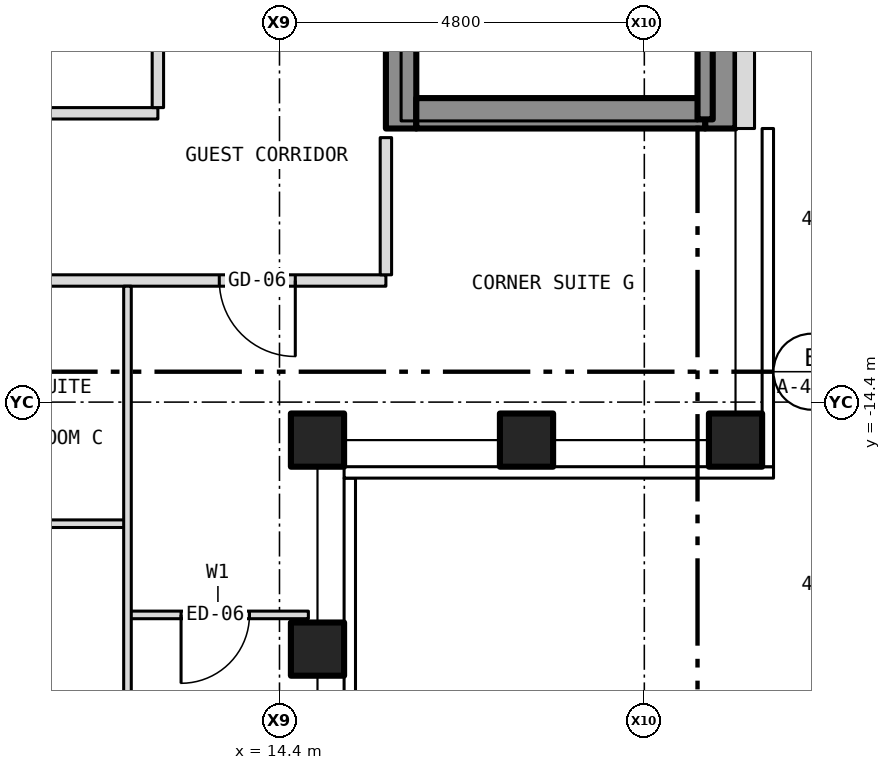
"""IFC4 building model, lengths in metres.
Left out: names, types, materials, properties, quantities, classifications, styles, units other than length and angle.
Written with IfcOpenShell. Run it as: python <this file> out.ifc"""

import sys

from ifc_helpers import new_model, si_unit, direction, frame, frame_2d, origin, origin_2d, place, context, subcontext, project, spatial, rectangle, hollow_rectangle, extrude, element, fill, save


model = new_model("IFC4")
c1 = context("Model", 3, precision=1e-05, world=origin(), true_north=direction((0.0, 1.0)))
c2 = subcontext(c1, "Body", "Model", "MODEL_VIEW")
j1 = project(units=[si_unit("LENGTHUNIT", "METRE"), si_unit("PLANEANGLEUNIT", "RADIAN")], contexts=[c1])
p1 = place(None, origin())
s1 = spatial("IfcSite", under=j1, at=p1, CompositionType="ELEMENT")
p2 = place(p1, origin())
s2 = spatial("IfcBuilding", under=s1, at=p2, CompositionType="ELEMENT")
p3 = place(p2, frame((0.0, 0.0, 229.5)))
s3 = spatial("IfcBuildingStorey", under=s2, at=p3, CompositionType="ELEMENT", Elevation=229.5)
for number, where, z_axis, x_axis in (
    (1, (20.4, -14.9, -0.15), (0.0, 0.0, 1.0), (1.0, 0.0, 0.0)),
    (2, (14.9, -14.9, -0.15), (0.0, 0.0, 1.0), (1.0, 0.0, 0.0)),
    (3, (14.9, -17.65, -0.15), (0.0, 0.0, 1.0), (1.0, 0.0, 0.0)),
    (4, (17.65, -14.9, -0.15), (0.0, 0.0, 1.0), (1.0, 0.0, 0.0)),
):
    element("IfcColumn", number, at=place(p3, frame(where, z_axis=z_axis, x_axis=x_axis)), inside=s3, PredefinedType="COLUMN", context=c2, shape_type="SweptSolid", body=[
        extrude(hollow_rectangle(XDim=0.7, YDim=0.7, WallThickness=0.04, at=origin_2d()), origin(), (0.0, 0.0, 1.0), 3.5),
    ])
p4 = place(p3, frame((16.0, -10.8, 0.0), z_axis=(0.0, 0.0, 1.0), x_axis=(0.0, 1.0, 0.0)))
e5 = element("IfcWall", 5, at=p4, inside=s3, PredefinedType="SHEAR", context=c2, shape_type="SweptSolid", body=[
    extrude(rectangle(XDim=21.6, YDim=0.4, at=frame_2d((10.8, 0.0))), origin(), (0.0, 0.0, 1.0), 3.25),
])
p5 = place(p4, frame((9.4, 0.0, 0.0)))
e6 = element("IfcOpeningElement", 6, at=p5, cuts=e5, PredefinedType="OPENING", context=c2, shape_type="SweptSolid", body=[
    extrude(rectangle(XDim=1.1, YDim=2.1, at=frame_2d((0.55, 1.05))), frame((0.0, 0.212, 0.0), z_axis=(0.0, -1.0, 0.0), x_axis=(1.0, 0.0, 0.0)), (0.0, 0.0, 1.0), 0.424),
])
p6 = place(p4, frame((11.5, 0.0, 0.0)))
e7 = element("IfcOpeningElement", 7, at=p6, cuts=e5, PredefinedType="OPENING", context=c2, shape_type="SweptSolid", body=[
    extrude(rectangle(XDim=1.1, YDim=2.1, at=frame_2d((0.55, 1.05))), frame((0.0, 0.212, 0.0), z_axis=(0.0, -1.0, 0.0), x_axis=(1.0, 0.0, 0.0)), (0.0, 0.0, 1.0), 0.424),
])
p7 = place(p4, frame((13.6, 0.0, 0.0)))
e8 = element("IfcOpeningElement", 8, at=p7, cuts=e5, PredefinedType="OPENING", context=c2, shape_type="SweptSolid", body=[
    extrude(rectangle(XDim=1.1, YDim=2.1, at=frame_2d((0.55, 1.05))), frame((0.0, 0.212, 0.0), z_axis=(0.0, -1.0, 0.0), x_axis=(1.0, 0.0, 0.0)), (0.0, 0.0, 1.0), 0.424),
])
p8 = place(p4, frame((15.7, 0.0, 0.0)))
e9 = element("IfcOpeningElement", 9, at=p8, cuts=e5, PredefinedType="OPENING", context=c2, shape_type="SweptSolid", body=[
    extrude(rectangle(XDim=1.1, YDim=2.1, at=frame_2d((0.55, 1.05))), frame((0.0, 0.212, 0.0), z_axis=(0.0, -1.0, 0.0), x_axis=(1.0, 0.0, 0.0)), (0.0, 0.0, 1.0), 0.424),
])
p9 = place(p4, frame((17.8, 0.0, 0.0)))
e10 = element("IfcOpeningElement", 10, at=p9, cuts=e5, PredefinedType="OPENING", context=c2, shape_type="SweptSolid", body=[
    extrude(rectangle(XDim=1.1, YDim=2.1, at=frame_2d((0.55, 1.05))), frame((0.0, 0.212, 0.0), z_axis=(0.0, -1.0, 0.0), x_axis=(1.0, 0.0, 0.0)), (0.0, 0.0, 1.0), 0.424),
])
p10 = place(p4, frame((5.642, 0.0, 0.0)))
e11 = element("IfcOpeningElement", 11, at=p10, cuts=e5, PredefinedType="OPENING", context=c2, shape_type="SweptSolid", body=[
    extrude(rectangle(XDim=1.1, YDim=2.1, at=frame_2d((0.55, 1.05))), frame((0.0, 0.212, 0.0), z_axis=(0.0, -1.0, 0.0), x_axis=(1.0, 0.0, 0.0)), (0.0, 0.0, 1.0), 0.424),
])
p11 = place(p4, frame((7.5, 0.0, 0.0)))
e12 = element("IfcOpeningElement", 12, at=p11, cuts=e5, PredefinedType="OPENING", context=c2, shape_type="SweptSolid", body=[
    extrude(rectangle(XDim=1.1, YDim=2.1, at=frame_2d((0.55, 1.05))), frame((0.0, 0.212, 0.0), z_axis=(0.0, -1.0, 0.0), x_axis=(1.0, 0.0, 0.0)), (0.0, 0.0, 1.0), 0.424),
])
p12 = place(p4, frame((20.0, 0.0, 0.0)))
e13 = element("IfcOpeningElement", 13, at=p12, cuts=e5, PredefinedType="OPENING", context=c2, shape_type="SweptSolid", body=[
    extrude(rectangle(XDim=0.9, YDim=2.1, at=frame_2d((0.45, 1.05))), frame((0.0, 0.212, 0.0), z_axis=(0.0, -1.0, 0.0), x_axis=(1.0, 0.0, 0.0)), (0.0, 0.0, 1.0), 0.424),
])
p13 = place(p3, frame((20.2, -10.8, 0.0), z_axis=(0.0, 0.0, 1.0), x_axis=(0.0, 1.0, 0.0)))
e14 = element("IfcWall", 14, at=p13, inside=s3, PredefinedType="SHEAR", context=c2, shape_type="SweptSolid", body=[
    extrude(rectangle(XDim=21.6, YDim=0.4, at=frame_2d((10.8, 0.0))), origin(), (0.0, 0.0, 1.0), 3.25),
])
p14 = place(p3, frame((16.2, -10.6, 0.0), z_axis=(0.0, 0.0, 1.0), x_axis=(1.0, 0.0, 0.0)))
e15 = element("IfcWall", 15, at=p14, inside=s3, PredefinedType="SHEAR", context=c2, shape_type="SweptSolid", body=[
    extrude(rectangle(XDim=3.8, YDim=0.4, at=frame_2d((1.9, 0.0))), origin(), (0.0, 0.0, 1.0), 3.25),
])
p15 = place(p3, frame((20.525, -10.8, 0.0), z_axis=(0.0, 0.0, 1.0), x_axis=(0.0, 1.0, 0.0)))
e16 = element("IfcWall", 16, at=p15, inside=s3, PredefinedType="SOLIDWALL", context=c2, shape_type="SweptSolid", body=[
    extrude(rectangle(XDim=21.6, YDim=0.25, at=frame_2d((10.8, 0.0))), origin(), (0.0, 0.0, 1.0), 3.5),
])
p16 = place(p15, frame((2.95, 0.0, 1.0)))
e17 = element("IfcOpeningElement", 17, at=p16, cuts=e16, PredefinedType="OPENING", context=c2, shape_type="SweptSolid", body=[
    extrude(rectangle(XDim=0.6, YDim=1.5, at=frame_2d((0.3, 0.75))), frame((0.0, 0.137, 0.0), z_axis=(0.0, -1.0, 0.0), x_axis=(1.0, 0.0, 0.0)), (0.0, 0.0, 1.0), 0.274),
])
p17 = place(p3, frame((12.4, -17.2, 0.0), z_axis=(0.0, 0.0, 1.0), x_axis=(1.0, 0.0, 0.0)))
e18 = element("IfcWall", 18, at=p17, inside=s3, PredefinedType="PARTITIONING", context=c2, shape_type="SweptSolid", body=[
    extrude(rectangle(XDim=2.38, YDim=0.1, at=frame_2d((1.19, 0.0))), origin(), (0.0, 0.0, 1.0), 3.35),
])
p18 = place(p17, frame((0.705, 0.0, 0.0)))
e19 = element("IfcOpeningElement", 19, at=p18, cuts=e18, PredefinedType="OPENING", context=c2, shape_type="SweptSolid", body=[
    extrude(rectangle(XDim=0.9, YDim=2.1, at=frame_2d((0.45, 1.05))), frame((0.0, 0.062, 0.0), z_axis=(0.0, -1.0, 0.0), x_axis=(1.0, 0.0, 0.0)), (0.0, 0.0, 1.0), 0.124),
])
p19 = place(p3, frame((10.2, -16.0, 0.0), z_axis=(0.0, 0.0, 1.0), x_axis=(1.0, 0.0, 0.0)))
e20 = element("IfcWall", 20, at=p19, inside=s3, PredefinedType="PARTITIONING", context=c2, shape_type="SweptSolid", body=[
    extrude(rectangle(XDim=2.2, YDim=0.1, at=frame_2d((1.1, 0.0))), origin(), (0.0, 0.0, 1.0), 3.35),
])
p20 = place(p3, frame((6.62, -12.8, 0.0), z_axis=(0.0, 0.0, 1.0), x_axis=(1.0, 0.0, 0.0)))
e21 = element("IfcWall", 21, at=p20, inside=s3, PredefinedType="PARTITIONING", context=c2, shape_type="SweptSolid", body=[
    extrude(rectangle(XDim=9.18, YDim=0.15, at=frame_2d((4.59, 0.0))), origin(), (0.0, 0.0, 1.0), 3.35),
])
p21 = place(p20, frame((1.314, 0.0, 0.0)))
e22 = element("IfcOpeningElement", 22, at=p21, cuts=e21, PredefinedType="OPENING", context=c2, shape_type="SweptSolid", body=[
    extrude(rectangle(XDim=1.0, YDim=2.1, at=frame_2d((0.5, 1.05))), frame((0.0, 0.087, 0.0), z_axis=(0.0, -1.0, 0.0), x_axis=(1.0, 0.0, 0.0)), (0.0, 0.0, 1.0), 0.174),
])
p22 = place(p20, frame((6.988, 0.0, 0.0)))
e23 = element("IfcOpeningElement", 23, at=p22, cuts=e21, PredefinedType="OPENING", context=c2, shape_type="SweptSolid", body=[
    extrude(rectangle(XDim=1.0, YDim=2.1, at=frame_2d((0.5, 1.05))), frame((0.0, 0.087, 0.0), z_axis=(0.0, -1.0, 0.0), x_axis=(1.0, 0.0, 0.0)), (0.0, 0.0, 1.0), 0.174),
])
p23 = place(p3, frame((9.7, -10.6, 0.0), z_axis=(0.0, 0.0, 1.0), x_axis=(1.0, 0.0, 0.0)))
e24 = element("IfcWall", 24, at=p23, inside=s3, PredefinedType="PARTITIONING", context=c2, shape_type="SweptSolid", body=[
    extrude(rectangle(XDim=3.1, YDim=0.15, at=frame_2d((1.55, 0.0))), origin(), (0.0, 0.0, 1.0), 3.35),
])
p24 = place(p3, frame((12.4, -20.78, 0.0), z_axis=(0.0, 0.0, 1.0), x_axis=(0.0, 1.0, 0.0)))
e25 = element("IfcWall", 25, at=p24, inside=s3, PredefinedType="PARTITIONING", context=c2, shape_type="SweptSolid", body=[
    extrude(rectangle(XDim=7.905, YDim=0.1, at=frame_2d((3.953, 0.0))), origin(), (0.0, 0.0, 1.0), 3.35),
])
p25 = place(p3, frame((12.8, -10.525, 0.0), z_axis=(0.0, 0.0, 1.0), x_axis=(0.0, 1.0, 0.0)))
e26 = element("IfcWall", 26, at=p25, inside=s3, PredefinedType="PARTITIONING", context=c2, shape_type="SweptSolid", body=[
    extrude(rectangle(XDim=8.525, YDim=0.15, at=frame_2d((4.262, 0.0))), origin(), (0.0, 0.0, 1.0), 3.35),
])
p26 = place(p3, frame((15.8, -12.725, 0.0), z_axis=(0.0, 0.0, 1.0), x_axis=(0.0, 1.0, 0.0)))
e27 = element("IfcWall", 27, at=p26, inside=s3, PredefinedType="PARTITIONING", context=c2, shape_type="SweptSolid", body=[
    extrude(rectangle(XDim=1.805, YDim=0.15, at=frame_2d((0.903, 0.0))), origin(), (0.0, 0.0, 1.0), 3.35),
])
p27 = place(p3, frame((20.0, -10.68, 0.0), z_axis=(0.0, 0.0, 1.0), x_axis=(0.0, 1.0, 0.0)))
e28 = element("IfcWall", 28, at=p27, inside=s3, PredefinedType="SHEAR", context=c2, shape_type="SweptSolid", body=[
    extrude(rectangle(XDim=8.68, YDim=0.2, at=frame_2d((4.34, 0.0))), origin(), (0.0, 0.0, 1.0), 3.25),
])
p28 = place(p18, origin())
e29 = element("IfcDoor", 29, at=p28, inside=s3, OperationType="SINGLE_SWING_LEFT", PredefinedType="DOOR", context=c2, shape_type="SweptSolid", body=[
    extrude(rectangle(XDim=0.9, YDim=2.1, at=frame_2d((0.45, 1.05))), frame((0.0, 0.025, 0.0), z_axis=(0.0, -1.0, 0.0), x_axis=(1.0, 0.0, 0.0)), (0.0, 0.0, 1.0), 0.05),
])
fill(e19, e29)
p29 = place(p22, origin())
e30 = element("IfcDoor", 30, at=p29, inside=s3, OperationType="SINGLE_SWING_RIGHT", PredefinedType="DOOR", context=c2, shape_type="SweptSolid", body=[
    extrude(rectangle(XDim=1.0, YDim=2.1, at=frame_2d((0.5, 1.05))), frame((0.0, 0.025, 0.0), z_axis=(0.0, -1.0, 0.0), x_axis=(1.0, 0.0, 0.0)), (0.0, 0.0, 1.0), 0.05),
])
fill(e23, e30)
save(model, sys.argv[1])
